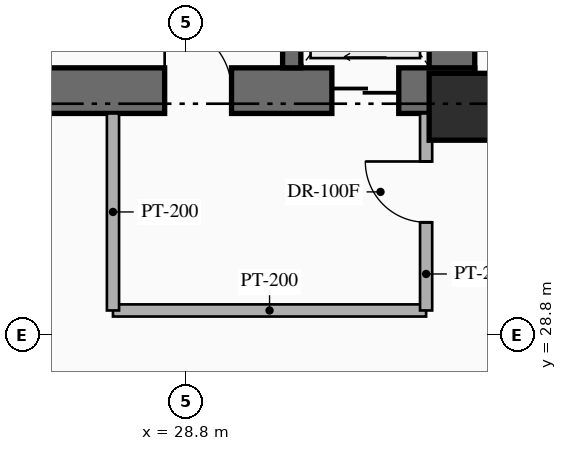
"""IFC4 building model, lengths in metres.
Left out: names, types, materials, properties, quantities, classifications, styles, units other than length and angle.
Written with IfcOpenShell. Run it as: python <this file> out.ifc"""

import sys

from ifc_helpers import new_model, si_unit, direction, frame, frame_2d, origin, origin_2d, place, context, subcontext, project, spatial, rectangle, extrude, element, fill, save


model = new_model("IFC4")
c1 = context("Model", 3, precision=1e-05, world=origin(), true_north=direction((0.0, 1.0)))
c2 = subcontext(c1, "Body", "Model", "MODEL_VIEW")
j1 = project(units=[si_unit("LENGTHUNIT", "METRE"), si_unit("PLANEANGLEUNIT", "RADIAN")], contexts=[c1])
p1 = place(None, origin())
s1 = spatial("IfcSite", under=j1, at=p1, CompositionType="ELEMENT")
p2 = place(p1, origin())
s2 = spatial("IfcBuilding", under=s1, at=p2, CompositionType="ELEMENT")
p3 = place(p2, frame((0.0, 0.0, -9.6)))
s3 = spatial("IfcBuildingStorey", under=s2, at=p3, CompositionType="ELEMENT", Elevation=-9.6)
p4 = place(p3, frame((25.47, 32.815, 0.0), z_axis=(0.0, 0.0, 1.0), x_axis=(1.0, 0.0, 0.0)))
e1 = element("IfcWall", 1, at=p4, inside=s3, PredefinedType="SHEAR", context=c2, shape_type="SweptSolid", body=[
    extrude(rectangle(XDim=8.08, YDim=0.75, at=frame_2d((4.04, 0.0))), origin(), (0.0, 0.0, 1.0), 4.8),
])
p5 = place(p4, frame((2.98, 0.0, 0.0)))
e2 = element("IfcOpeningElement", 2, at=p5, cuts=e1, PredefinedType="OPENING", context=c2, shape_type="SweptSolid", body=[
    extrude(rectangle(XDim=1.1, YDim=2.2, at=frame_2d((0.55, 1.1))), frame((0.0, 0.385, 0.0), z_axis=(0.0, -1.0, 0.0), x_axis=(1.0, 0.0, 0.0)), (0.0, 0.0, 1.0), 0.77),
])
p6 = place(p4, frame((5.73, 0.0, 0.0)))
e3 = element("IfcOpeningElement", 3, at=p6, cuts=e1, PredefinedType="OPENING", context=c2, shape_type="SweptSolid", body=[
    extrude(rectangle(XDim=1.1, YDim=2.15, at=frame_2d((0.55, 1.075))), frame((0.0, 0.385, 0.0), z_axis=(0.0, -1.0, 0.0), x_axis=(1.0, 0.0, 0.0)), (0.0, 0.0, 1.0), 0.77),
])
p7 = place(p3, frame((33.175, 33.19, 0.0), z_axis=(0.0, 0.0, 1.0), x_axis=(0.0, 1.0, 0.0)))
e4 = element("IfcWall", 4, at=p7, inside=s3, PredefinedType="SHEAR", context=c2, shape_type="SweptSolid", body=[
    extrude(rectangle(XDim=9.48, YDim=0.75, at=frame_2d((4.74, 0.0))), origin(), (0.0, 0.0, 1.0), 4.8),
])
p8 = place(p7, frame((4.16, 0.0, 0.0)))
e5 = element("IfcOpeningElement", 5, at=p8, cuts=e4, PredefinedType="OPENING", context=c2, shape_type="SweptSolid", body=[
    extrude(rectangle(XDim=0.85, YDim=2.08, at=frame_2d((0.425, 1.04))), frame((0.0, 0.385, 0.0), z_axis=(0.0, -1.0, 0.0), x_axis=(1.0, 0.0, 0.0)), (0.0, 0.0, 1.0), 0.77),
])
p9 = place(p7, frame((7.36, 0.0, 0.0)))
e6 = element("IfcOpeningElement", 6, at=p9, cuts=e4, PredefinedType="OPENING", context=c2, shape_type="SweptSolid", body=[
    extrude(rectangle(XDim=0.85, YDim=2.08, at=frame_2d((0.425, 1.04))), frame((0.0, 0.385, 0.0), z_axis=(0.0, -1.0, 0.0), x_axis=(1.0, 0.0, 0.0)), (0.0, 0.0, 1.0), 0.77),
])
p10 = place(p3, frame((30.54, 33.19, 0.0), z_axis=(0.0, 0.0, 1.0), x_axis=(0.0, 1.0, 0.0)))
e7 = element("IfcWall", 7, at=p10, inside=s3, PredefinedType="SHEAR", context=c2, shape_type="SweptSolid", body=[
    extrude(rectangle(XDim=9.48, YDim=0.3, at=frame_2d((4.74, 0.0))), origin(), (0.0, 0.0, 1.0), 4.8),
])
p11 = place(p3, frame((33.35, 32.55, 0.0), z_axis=(0.0, 0.0, 1.0), x_axis=(1.0, 0.0, 0.0)))
e8 = element("IfcColumn", 8, at=p11, inside=s3, PredefinedType="COLUMN", context=c2, shape_type="SweptSolid", body=[
    extrude(rectangle(XDim=1.1, YDim=1.1, at=origin_2d()), origin(), (0.0, 0.0, 1.0), 4.8),
])
p12 = place(p3, frame((27.6, 29.2, 0.0), z_axis=(0.0, 0.0, 1.0), x_axis=(1.0, 0.0, 0.0)))
e9 = element("IfcWall", 9, at=p12, inside=s3, PredefinedType="STANDARD", context=c2, shape_type="SweptSolid", body=[
    extrude(rectangle(XDim=5.15, YDim=0.2, at=frame_2d((2.575, 0.0))), origin(), (0.0, 0.0, 1.0), 4.5),
])
p13 = place(p3, frame((27.6, 29.2, 0.0), z_axis=(0.0, 0.0, 1.0), x_axis=(0.0, 1.0, 0.0)))
e10 = element("IfcWall", 10, at=p13, inside=s3, PredefinedType="STANDARD", context=c2, shape_type="SweptSolid", body=[
    extrude(rectangle(XDim=3.24, YDim=0.2, at=frame_2d((1.62, 0.0))), origin(), (0.0, 0.0, 1.0), 4.5),
])
p14 = place(p3, frame((32.75, 29.2, 0.0), z_axis=(0.0, 0.0, 1.0), x_axis=(0.0, 1.0, 0.0)))
e11 = element("IfcWall", 11, at=p14, inside=s3, PredefinedType="STANDARD", context=c2, shape_type="SweptSolid", body=[
    extrude(rectangle(XDim=3.24, YDim=0.2, at=frame_2d((1.62, 0.0))), origin(), (0.0, 0.0, 1.0), 4.5),
])
p15 = place(p14, frame((1.45, 0.0, 0.0)))
e12 = element("IfcOpeningElement", 12, at=p15, cuts=e11, PredefinedType="OPENING", context=c2, shape_type="SweptSolid", body=[
    extrude(rectangle(XDim=1.0, YDim=2.2, at=frame_2d((0.5, 1.1))), frame((0.0, 0.11, 0.0), z_axis=(0.0, -1.0, 0.0), x_axis=(1.0, 0.0, 0.0)), (0.0, 0.0, 1.0), 0.22),
])
p16 = place(p5, origin())
e13 = element("IfcDoor", 13, at=p16, inside=s3, OperationType="SINGLE_SWING_LEFT", PredefinedType="DOOR", context=c2, shape_type="SweptSolid", body=[
    extrude(rectangle(XDim=1.1, YDim=2.2, at=frame_2d((0.55, 1.1))), frame((0.0, 0.025, 0.0), z_axis=(0.0, -1.0, 0.0), x_axis=(1.0, 0.0, 0.0)), (0.0, 0.0, 1.0), 0.05),
])
fill(e2, e13)
p17 = place(p6, origin())
e14 = element("IfcDoor", 14, at=p17, inside=s3, OperationType="SLIDING_TO_LEFT", PredefinedType="USERDEFINED", context=c2, shape_type="SweptSolid", body=[
    extrude(rectangle(XDim=1.1, YDim=2.15, at=frame_2d((0.55, 1.075))), frame((0.0, 0.025, 0.0), z_axis=(0.0, -1.0, 0.0), x_axis=(1.0, 0.0, 0.0)), (0.0, 0.0, 1.0), 0.05),
])
fill(e3, e14)
p18 = place(p15, origin())
e15 = element("IfcDoor", 15, at=p18, inside=s3, OperationType="SINGLE_SWING_RIGHT", PredefinedType="DOOR", context=c2, shape_type="SweptSolid", body=[
    extrude(rectangle(XDim=1.0, YDim=2.2, at=frame_2d((0.5, 1.1))), frame((0.0, 0.025, 0.0), z_axis=(0.0, -1.0, 0.0), x_axis=(1.0, 0.0, 0.0)), (0.0, 0.0, 1.0), 0.05),
])
fill(e12, e15)
save(model, sys.argv[1])
